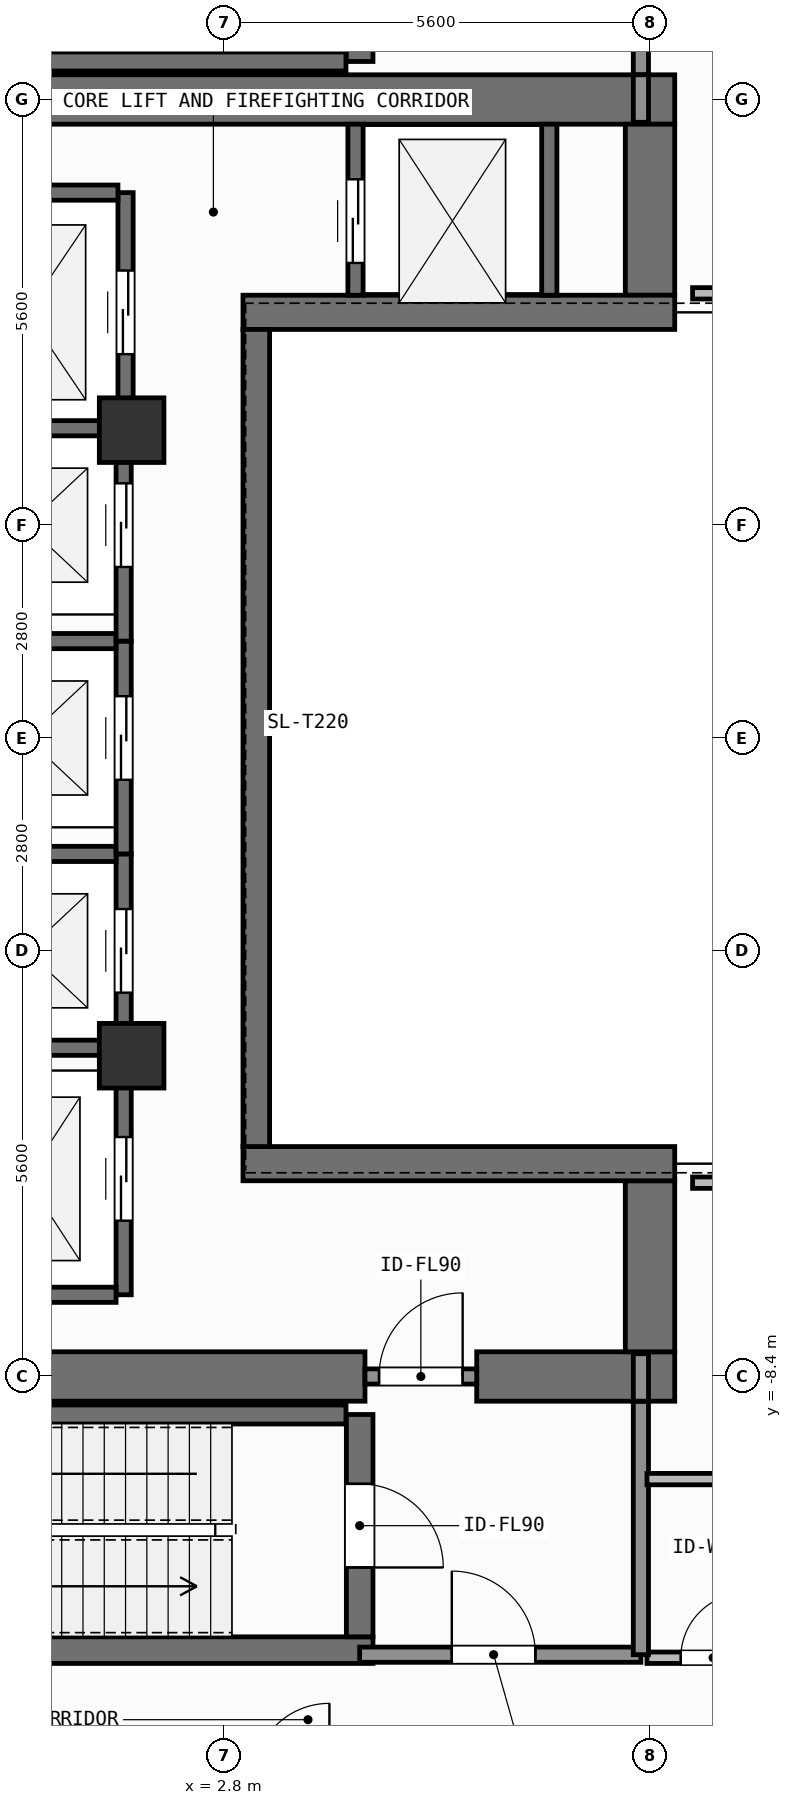
"""IFC4 building model, lengths in metres.
Left out: names, types, materials, properties, quantities, classifications, styles, units other than length and angle.
Written with IfcOpenShell. Run it as: python <this file> out.ifc"""

import sys

from ifc_helpers import new_model, si_unit, direction, frame, frame_2d, origin, origin_2d, place, context, subcontext, project, spatial, rectangle, extrude, element, fill, save


model = new_model("IFC4")
c1 = context("Model", 3, precision=1e-05, world=origin(), true_north=direction((0.0, 1.0)))
c2 = subcontext(c1, "Body", "Model", "MODEL_VIEW")
j1 = project(units=[si_unit("LENGTHUNIT", "METRE"), si_unit("PLANEANGLEUNIT", "RADIAN")], contexts=[c1])
p1 = place(None, origin())
s1 = spatial("IfcSite", under=j1, at=p1, CompositionType="ELEMENT")
p2 = place(p1, origin())
s2 = spatial("IfcBuilding", under=s1, at=p2, CompositionType="ELEMENT")
p3 = place(p2, frame((0.0, 0.0, 262.5)))
s3 = spatial("IfcBuildingStorey", under=s2, at=p3, CompositionType="ELEMENT", Elevation=262.5)
p4 = place(p3, frame((-2.62, -8.4, 0.0), z_axis=(0.0, 0.0, 1.0), x_axis=(1.0, 0.0, 0.0)))
e1 = element("IfcWall", 1, at=p4, inside=s3, PredefinedType="SHEAR", context=c2, shape_type="SweptSolid", body=[
    extrude(rectangle(XDim=7.27, YDim=0.65, at=frame_2d((3.635, 0.0))), origin(), (0.0, 0.0, 1.0), 3.9),
])
p5 = place(p3, frame((6.12, -8.4, 0.0), z_axis=(0.0, 0.0, 1.0), x_axis=(1.0, 0.0, 0.0)))
e2 = element("IfcWall", 2, at=p5, inside=s3, PredefinedType="SHEAR", context=c2, shape_type="SweptSolid", body=[
    extrude(rectangle(XDim=2.605, YDim=0.65, at=frame_2d((1.302, 0.0))), origin(), (0.0, 0.0, 1.0), 3.9),
])
p6 = place(p3, frame((-7.55, 8.4, 0.0), z_axis=(0.0, 0.0, 1.0), x_axis=(1.0, 0.0, 0.0)))
e3 = element("IfcWall", 3, at=p6, inside=s3, PredefinedType="SHEAR", context=c2, shape_type="SweptSolid", body=[
    extrude(rectangle(XDim=16.275, YDim=0.65, at=frame_2d((8.138, 0.0))), origin(), (0.0, 0.0, 1.0), 3.9),
])
for number, where, z_axis, x_axis in (
    (4, (8.4, -8.075, 0.0), (0.0, 0.0, 1.0), (0.0, 1.0, 0.0)),
    (5, (8.4, 5.825, 0.0), (0.0, 0.0, 1.0), (0.0, 1.0, 0.0)),
):
    element("IfcWall", number, at=place(p3, frame(where, z_axis=z_axis, x_axis=x_axis)), inside=s3, PredefinedType="SHEAR", context=c2, shape_type="SweptSolid", body=[
        extrude(rectangle(XDim=2.25, YDim=0.65, at=frame_2d((1.125, 0.0))), origin(), (0.0, 0.0, 1.0), 3.9),
    ])
for number, where, z_axis, x_axis in (
    (6, (3.045, -5.6, 0.0), (0.0, 0.0, 1.0), (1.0, 0.0, 0.0)),
    (7, (3.045, 5.6, 0.0), (0.0, 0.0, 1.0), (1.0, 0.0, 0.0)),
):
    element("IfcWall", number, at=place(p3, frame(where, z_axis=z_axis, x_axis=x_axis)), inside=s3, PredefinedType="SHEAR", context=c2, shape_type="SweptSolid", body=[
        extrude(rectangle(XDim=5.68, YDim=0.45, at=frame_2d((2.84, 0.0))), origin(), (0.0, 0.0, 1.0), 3.9),
    ])
p7 = place(p3, frame((3.22, -5.375, 0.0), z_axis=(0.0, 0.0, 1.0), x_axis=(0.0, 1.0, 0.0)))
e8 = element("IfcWall", 8, at=p7, inside=s3, PredefinedType="SHEAR", context=c2, shape_type="SweptSolid", body=[
    extrude(rectangle(XDim=10.75, YDim=0.35, at=frame_2d((5.375, 0.0))), origin(), (0.0, 0.0, 1.0), 3.9),
])
p8 = place(p3, frame((-2.555, -12.0, 0.0), z_axis=(0.0, 0.0, 1.0), x_axis=(1.0, 0.0, 0.0)))
e9 = element("IfcWall", 9, at=p8, inside=s3, PredefinedType="SHEAR", context=c2, shape_type="SweptSolid", body=[
    extrude(rectangle(XDim=7.31, YDim=0.35, at=frame_2d((3.655, 0.0))), origin(), (0.0, 0.0, 1.0), 3.9),
])
p9 = place(p3, frame((-2.2, -8.9, 0.0), z_axis=(0.0, 0.0, 1.0), x_axis=(1.0, 0.0, 0.0)))
e10 = element("IfcWall", 10, at=p9, inside=s3, PredefinedType="SHEAR", context=c2, shape_type="SweptSolid", body=[
    extrude(rectangle(XDim=6.6, YDim=0.25, at=frame_2d((3.3, 0.0))), origin(), (0.0, 0.0, 1.0), 3.9),
])
p10 = place(p3, frame((4.58, -8.9, 0.0), z_axis=(0.0, 0.0, 1.0), x_axis=(0.0, -1.0, 0.0)))
e11 = element("IfcWall", 11, at=p10, inside=s3, PredefinedType="SHEAR", context=c2, shape_type="SweptSolid", body=[
    extrude(rectangle(XDim=2.925, YDim=0.35, at=frame_2d((1.462, 0.0))), origin(), (0.0, 0.0, 1.0), 3.9),
])
p11 = place(p10, frame((0.913, 0.0, 0.0)))
e12 = element("IfcOpeningElement", 12, at=p11, cuts=e11, PredefinedType="OPENING", context=c2, shape_type="SweptSolid", body=[
    extrude(rectangle(XDim=1.1, YDim=2.15, at=frame_2d((0.55, 1.075))), frame((0.0, 0.185, 0.0), z_axis=(0.0, -1.0, 0.0), x_axis=(1.0, 0.0, 0.0)), (0.0, 0.0, 1.0), 0.37),
])
p12 = place(p3, frame((-2.2, 8.9, 0.0), z_axis=(0.0, 0.0, 1.0), x_axis=(1.0, 0.0, 0.0)))
e13 = element("IfcWall", 13, at=p12, inside=s3, PredefinedType="SHEAR", context=c2, shape_type="SweptSolid", body=[
    extrude(rectangle(XDim=6.6, YDim=0.25, at=frame_2d((3.3, 0.0))), origin(), (0.0, 0.0, 1.0), 3.9),
])
p13 = place(p3, frame((4.58, 11.825, 0.0), z_axis=(0.0, 0.0, 1.0), x_axis=(0.0, -1.0, 0.0)))
e14 = element("IfcWall", 14, at=p13, inside=s3, PredefinedType="SHEAR", context=c2, shape_type="SweptSolid", body=[
    extrude(rectangle(XDim=2.925, YDim=0.35, at=frame_2d((1.462, 0.0))), origin(), (0.0, 0.0, 1.0), 3.9),
])
p14 = place(p13, frame((0.913, 0.0, 0.0)))
e15 = element("IfcOpeningElement", 15, at=p14, cuts=e14, PredefinedType="OPENING", context=c2, shape_type="SweptSolid", body=[
    extrude(rectangle(XDim=1.1, YDim=2.15, at=frame_2d((0.55, 1.075))), frame((0.0, 0.185, 0.0), z_axis=(0.0, -1.0, 0.0), x_axis=(1.0, 0.0, 0.0)), (0.0, 0.0, 1.0), 0.37),
])
for number, where, z_axis, x_axis in (
    (16, (1.58, -4.18, 0.0), (0.0, 0.0, 1.0), (1.0, 0.0, 0.0)),
    (17, (1.58, 4.05, 0.0), (0.0, 0.0, 1.0), (1.0, 0.0, 0.0)),
):
    element("IfcColumn", number, at=place(p3, frame(where, z_axis=z_axis, x_axis=x_axis)), inside=s3, PredefinedType="COLUMN", context=c2, shape_type="SweptSolid", body=[
        extrude(rectangle(XDim=0.85, YDim=0.85, at=origin_2d()), origin(), (0.0, 0.0, 1.0), 3.9),
    ])
p15 = place(p3, frame((1.475, -4.275, 0.0), z_axis=(0.0, 0.0, 1.0), x_axis=(0.0, 1.0, 0.0)))
e18 = element("IfcWall", 18, at=p15, inside=s3, PredefinedType="SHEAR", context=c2, shape_type="SweptSolid", body=[
    extrude(rectangle(XDim=2.75, YDim=0.2, at=frame_2d((1.375, 0.0))), origin(), (0.0, 0.0, 1.0), 3.68),
])
p16 = place(p15, frame((0.925, 0.0, 0.0)))
e19 = element("IfcOpeningElement", 19, at=p16, cuts=e18, PredefinedType="OPENING", context=c2, shape_type="SweptSolid", body=[
    extrude(rectangle(XDim=1.1, YDim=2.2, at=frame_2d((0.55, 1.1))), frame((0.0, 0.11, 0.0), z_axis=(0.0, -1.0, 0.0), x_axis=(1.0, 0.0, 0.0)), (0.0, 0.0, 1.0), 0.22),
])
for number, where, z_axis, x_axis in (
    (20, (-0.975, -4.075, 0.0), (0.0, 0.0, 1.0), (1.0, 0.0, 0.0)),
    (21, (-0.975, -1.525, 0.0), (0.0, 0.0, 1.0), (1.0, 0.0, 0.0)),
):
    element("IfcWall", number, at=place(p3, frame(where, z_axis=z_axis, x_axis=x_axis)), inside=s3, PredefinedType="SHEAR", context=c2, shape_type="SweptSolid", body=[
        extrude(rectangle(XDim=2.35, YDim=0.2, at=frame_2d((1.175, 0.0))), origin(), (0.0, 0.0, 1.0), 3.68),
    ])
p17 = place(p3, frame((1.475, -1.525, 0.0), z_axis=(0.0, 0.0, 1.0), x_axis=(0.0, 1.0, 0.0)))
e22 = element("IfcWall", 22, at=p17, inside=s3, PredefinedType="SHEAR", context=c2, shape_type="SweptSolid", body=[
    extrude(rectangle(XDim=2.8, YDim=0.2, at=frame_2d((1.4, 0.0))), origin(), (0.0, 0.0, 1.0), 3.68),
])
p18 = place(p17, frame((0.975, 0.0, 0.0)))
e23 = element("IfcOpeningElement", 23, at=p18, cuts=e22, PredefinedType="OPENING", context=c2, shape_type="SweptSolid", body=[
    extrude(rectangle(XDim=1.1, YDim=2.2, at=frame_2d((0.55, 1.1))), frame((0.0, 0.11, 0.0), z_axis=(0.0, -1.0, 0.0), x_axis=(1.0, 0.0, 0.0)), (0.0, 0.0, 1.0), 0.22),
])
p19 = place(p3, frame((-0.975, 1.275, 0.0), z_axis=(0.0, 0.0, 1.0), x_axis=(1.0, 0.0, 0.0)))
e24 = element("IfcWall", 24, at=p19, inside=s3, PredefinedType="SHEAR", context=c2, shape_type="SweptSolid", body=[
    extrude(rectangle(XDim=2.35, YDim=0.2, at=frame_2d((1.175, 0.0))), origin(), (0.0, 0.0, 1.0), 3.68),
])
p20 = place(p3, frame((1.475, 1.275, 0.0), z_axis=(0.0, 0.0, 1.0), x_axis=(0.0, 1.0, 0.0)))
e25 = element("IfcWall", 25, at=p20, inside=s3, PredefinedType="SHEAR", context=c2, shape_type="SweptSolid", body=[
    extrude(rectangle(XDim=2.8, YDim=0.2, at=frame_2d((1.4, 0.0))), origin(), (0.0, 0.0, 1.0), 3.68),
])
p21 = place(p20, frame((0.975, 0.0, 0.0)))
e26 = element("IfcOpeningElement", 26, at=p21, cuts=e25, PredefinedType="OPENING", context=c2, shape_type="SweptSolid", body=[
    extrude(rectangle(XDim=1.1, YDim=2.2, at=frame_2d((0.55, 1.1))), frame((0.0, 0.11, 0.0), z_axis=(0.0, -1.0, 0.0), x_axis=(1.0, 0.0, 0.0)), (0.0, 0.0, 1.0), 0.22),
])
p22 = place(p3, frame((-0.975, 4.075, 0.0), z_axis=(0.0, 0.0, 1.0), x_axis=(1.0, 0.0, 0.0)))
e27 = element("IfcWall", 27, at=p22, inside=s3, PredefinedType="SHEAR", context=c2, shape_type="SweptSolid", body=[
    extrude(rectangle(XDim=2.35, YDim=0.2, at=frame_2d((1.175, 0.0))), origin(), (0.0, 0.0, 1.0), 3.68),
])
p23 = place(p3, frame((1.5, 4.025, 0.0), z_axis=(0.0, 0.0, 1.0), x_axis=(0.0, 1.0, 0.0)))
e28 = element("IfcWall", 28, at=p23, inside=s3, PredefinedType="SHEAR", context=c2, shape_type="SweptSolid", body=[
    extrude(rectangle(XDim=3.15, YDim=0.2, at=frame_2d((1.575, 0.0))), origin(), (0.0, 0.0, 1.0), 3.68),
])
p24 = place(p23, frame((1.025, 0.0, 0.0)))
e29 = element("IfcOpeningElement", 29, at=p24, cuts=e28, PredefinedType="OPENING", context=c2, shape_type="SweptSolid", body=[
    extrude(rectangle(XDim=1.1, YDim=2.2, at=frame_2d((0.55, 1.1))), frame((0.0, 0.11, 0.0), z_axis=(0.0, -1.0, 0.0), x_axis=(1.0, 0.0, 0.0)), (0.0, 0.0, 1.0), 0.22),
])
p25 = place(p3, frame((-1.0, 7.175, 0.0), z_axis=(0.0, 0.0, 1.0), x_axis=(1.0, 0.0, 0.0)))
e30 = element("IfcWall", 30, at=p25, inside=s3, PredefinedType="SHEAR", context=c2, shape_type="SweptSolid", body=[
    extrude(rectangle(XDim=2.4, YDim=0.2, at=frame_2d((1.2, 0.0))), origin(), (0.0, 0.0, 1.0), 3.68),
])
p26 = place(p3, frame((1.475, -7.325, 0.0), z_axis=(0.0, 0.0, 1.0), x_axis=(0.0, 1.0, 0.0)))
e31 = element("IfcWall", 31, at=p26, inside=s3, PredefinedType="SHEAR", context=c2, shape_type="SweptSolid", body=[
    extrude(rectangle(XDim=3.05, YDim=0.2, at=frame_2d((1.525, 0.0))), origin(), (0.0, 0.0, 1.0), 3.68),
])
p27 = place(p26, frame((0.975, 0.0, 0.0)))
e32 = element("IfcOpeningElement", 32, at=p27, cuts=e31, PredefinedType="OPENING", context=c2, shape_type="SweptSolid", body=[
    extrude(rectangle(XDim=1.1, YDim=2.2, at=frame_2d((0.55, 1.1))), frame((0.0, 0.11, 0.0), z_axis=(0.0, -1.0, 0.0), x_axis=(1.0, 0.0, 0.0)), (0.0, 0.0, 1.0), 0.22),
])
p28 = place(p3, frame((-0.975, -7.325, 0.0), z_axis=(0.0, 0.0, 1.0), x_axis=(1.0, 0.0, 0.0)))
e33 = element("IfcWall", 33, at=p28, inside=s3, PredefinedType="SHEAR", context=c2, shape_type="SweptSolid", body=[
    extrude(rectangle(XDim=2.35, YDim=0.2, at=frame_2d((1.175, 0.0))), origin(), (0.0, 0.0, 1.0), 3.68),
])
p29 = place(p3, frame((4.525, 5.825, 0.0), z_axis=(0.0, 0.0, 1.0), x_axis=(0.0, 1.0, 0.0)))
e34 = element("IfcWall", 34, at=p29, inside=s3, PredefinedType="SHEAR", context=c2, shape_type="SweptSolid", body=[
    extrude(rectangle(XDim=2.25, YDim=0.2, at=frame_2d((1.125, 0.0))), origin(), (0.0, 0.0, 1.0), 3.68),
])
p30 = place(p29, frame((0.425, 0.0, 0.0)))
e35 = element("IfcOpeningElement", 35, at=p30, cuts=e34, PredefinedType="OPENING", context=c2, shape_type="SweptSolid", body=[
    extrude(rectangle(XDim=1.1, YDim=2.2, at=frame_2d((0.55, 1.1))), frame((0.0, 0.11, 0.0), z_axis=(0.0, -1.0, 0.0), x_axis=(1.0, 0.0, 0.0)), (0.0, 0.0, 1.0), 0.22),
])
p31 = place(p3, frame((7.075, 5.825, 0.0), z_axis=(0.0, 0.0, 1.0), x_axis=(0.0, 1.0, 0.0)))
e36 = element("IfcWall", 36, at=p31, inside=s3, PredefinedType="SHEAR", context=c2, shape_type="SweptSolid", body=[
    extrude(rectangle(XDim=2.25, YDim=0.2, at=frame_2d((1.125, 0.0))), origin(), (0.0, 0.0, 1.0), 3.68),
])
p32 = place(p3, frame((4.58, -12.06, 0.0), z_axis=(0.0, 0.0, 1.0), x_axis=(1.0, 0.0, 0.0)))
e37 = element("IfcWall", 37, at=p32, inside=s3, PredefinedType="SOLIDWALL", context=c2, shape_type="SweptSolid", body=[
    extrude(rectangle(XDim=3.7, YDim=0.2, at=frame_2d((1.85, 0.0))), origin(), (0.0, 0.0, 1.0), 3.68),
])
p33 = place(p32, frame((1.212, 0.0, 0.0)))
e38 = element("IfcOpeningElement", 38, at=p33, cuts=e37, PredefinedType="OPENING", context=c2, shape_type="SweptSolid", body=[
    extrude(rectangle(XDim=1.1, YDim=2.15, at=frame_2d((0.55, 1.075))), frame((0.0, 0.11, 0.0), z_axis=(0.0, -1.0, 0.0), x_axis=(1.0, 0.0, 0.0)), (0.0, 0.0, 1.0), 0.22),
])
p34 = place(p3, frame((4.65, -8.4, 0.0), z_axis=(0.0, 0.0, 1.0), x_axis=(1.0, 0.0, 0.0)))
e39 = element("IfcWall", 39, at=p34, inside=s3, PredefinedType="SOLIDWALL", context=c2, shape_type="SweptSolid", body=[
    extrude(rectangle(XDim=1.47, YDim=0.2, at=frame_2d((0.735, 0.0))), origin(), (0.0, 0.0, 1.0), 2.92),
])
p35 = place(p34, frame((0.185, 0.0, 0.0)))
e40 = element("IfcOpeningElement", 40, at=p35, cuts=e39, PredefinedType="OPENING", context=c2, shape_type="SweptSolid", body=[
    extrude(rectangle(XDim=1.1, YDim=2.15, at=frame_2d((0.55, 1.075))), frame((0.0, 0.11, 0.0), z_axis=(0.0, -1.0, 0.0), x_axis=(1.0, 0.0, 0.0)), (0.0, 0.0, 1.0), 0.22),
])
p36 = place(p3, frame((8.36, -12.1, 0.0), z_axis=(0.0, 0.0, 1.0), x_axis=(1.0, 0.0, 0.0)))
e41 = element("IfcWall", 41, at=p36, inside=s3, PredefinedType="PARTITIONING", context=c2, shape_type="SweptSolid", body=[
    extrude(rectangle(XDim=1.74, YDim=0.15, at=frame_2d((0.87, 0.0))), origin(), (0.0, 0.0, 1.0), 3.68),
])
p37 = place(p36, frame((0.445, 0.0, 0.0)))
e42 = element("IfcOpeningElement", 42, at=p37, cuts=e41, PredefinedType="OPENING", context=c2, shape_type="SweptSolid", body=[
    extrude(rectangle(XDim=0.85, YDim=2.1, at=frame_2d((0.425, 1.05))), frame((0.0, 0.085, 0.0), z_axis=(0.0, -1.0, 0.0), x_axis=(1.0, 0.0, 0.0)), (0.0, 0.0, 1.0), 0.17),
])
for number, where, z_axis, x_axis in (
    (43, (8.28, -12.06, 0.0), (0.0, 0.0, 1.0), (0.0, 1.0, 0.0)),
    (44, (8.28, 8.725, 0.0), (0.0, 0.0, 1.0), (0.0, 1.0, 0.0)),
):
    element("IfcWall", number, at=place(p3, frame(where, z_axis=z_axis, x_axis=x_axis)), inside=s3, PredefinedType="SOLIDWALL", context=c2, shape_type="SweptSolid", body=[
        extrude(rectangle(XDim=3.335, YDim=0.2, at=frame_2d((1.667, 0.0))), origin(), (0.0, 0.0, 1.0), 3.68),
    ])
p38 = place(p3, frame((8.28, -8.725, 0.0), z_axis=(0.0, 0.0, 1.0), x_axis=(0.0, 1.0, 0.0)))
e45 = element("IfcWall", 45, at=p38, inside=s3, PredefinedType="SOLIDWALL", context=c2, shape_type="SweptSolid", body=[
    extrude(rectangle(XDim=0.625, YDim=0.2, at=frame_2d((0.312, 0.0))), origin(), (0.0, 0.0, 1.0), 3.68),
])
p39 = place(p3, frame((8.36, -9.75, 0.0), z_axis=(0.0, 0.0, 1.0), x_axis=(1.0, 0.0, 0.0)))
e46 = element("IfcWall", 46, at=p39, inside=s3, PredefinedType="PARTITIONING", context=c2, shape_type="SweptSolid", body=[
    extrude(rectangle(XDim=1.74, YDim=0.15, at=frame_2d((0.87, 0.0))), origin(), (0.0, 0.0, 1.0), 3.68),
])
p40 = place(p3, frame((8.96, -5.85, 0.0), z_axis=(0.0, 0.0, 1.0), x_axis=(1.0, 0.0, 0.0)))
e47 = element("IfcWall", 47, at=p40, inside=s3, PredefinedType="PARTITIONING", context=c2, shape_type="SweptSolid", body=[
    extrude(rectangle(XDim=6.62, YDim=0.15, at=frame_2d((3.31, 0.0))), origin(), (0.0, 0.0, 1.0), 3.68),
])
p41 = place(p3, frame((8.28, 8.1, 0.0), z_axis=(0.0, 0.0, 1.0), x_axis=(0.0, 1.0, 0.0)))
e48 = element("IfcWall", 48, at=p41, inside=s3, PredefinedType="SOLIDWALL", context=c2, shape_type="SweptSolid", body=[
    extrude(rectangle(XDim=0.625, YDim=0.2, at=frame_2d((0.312, 0.0))), origin(), (0.0, 0.0, 1.0), 3.68),
])
p42 = place(p3, frame((8.96, 5.85, 0.0), z_axis=(0.0, 0.0, 1.0), x_axis=(1.0, 0.0, 0.0)))
e49 = element("IfcWall", 49, at=p42, inside=s3, PredefinedType="PARTITIONING", context=c2, shape_type="SweptSolid", body=[
    extrude(rectangle(XDim=6.62, YDim=0.15, at=frame_2d((3.31, 0.0))), origin(), (0.0, 0.0, 1.0), 3.68),
])
p43 = place(p16, origin())
e50 = element("IfcDoor", 50, at=p43, inside=s3, OperationType="SLIDING_TO_LEFT", PredefinedType="DOOR", context=c2, shape_type="SweptSolid", body=[
    extrude(rectangle(XDim=1.1, YDim=2.2, at=frame_2d((0.55, 1.1))), frame((0.0, 0.025, 0.0), z_axis=(0.0, -1.0, 0.0), x_axis=(1.0, 0.0, 0.0)), (0.0, 0.0, 1.0), 0.05),
])
fill(e19, e50)
p44 = place(p18, origin())
e51 = element("IfcDoor", 51, at=p44, inside=s3, OperationType="SLIDING_TO_LEFT", PredefinedType="DOOR", context=c2, shape_type="SweptSolid", body=[
    extrude(rectangle(XDim=1.1, YDim=2.2, at=frame_2d((0.55, 1.1))), frame((0.0, 0.025, 0.0), z_axis=(0.0, -1.0, 0.0), x_axis=(1.0, 0.0, 0.0)), (0.0, 0.0, 1.0), 0.05),
])
fill(e23, e51)
p45 = place(p21, origin())
e52 = element("IfcDoor", 52, at=p45, inside=s3, OperationType="SLIDING_TO_LEFT", PredefinedType="DOOR", context=c2, shape_type="SweptSolid", body=[
    extrude(rectangle(XDim=1.1, YDim=2.2, at=frame_2d((0.55, 1.1))), frame((0.0, 0.025, 0.0), z_axis=(0.0, -1.0, 0.0), x_axis=(1.0, 0.0, 0.0)), (0.0, 0.0, 1.0), 0.05),
])
fill(e26, e52)
p46 = place(p24, origin())
e53 = element("IfcDoor", 53, at=p46, inside=s3, OperationType="SLIDING_TO_LEFT", PredefinedType="DOOR", context=c2, shape_type="SweptSolid", body=[
    extrude(rectangle(XDim=1.1, YDim=2.2, at=frame_2d((0.55, 1.1))), frame((0.0, 0.025, 0.0), z_axis=(0.0, -1.0, 0.0), x_axis=(1.0, 0.0, 0.0)), (0.0, 0.0, 1.0), 0.05),
])
fill(e29, e53)
p47 = place(p27, origin())
e54 = element("IfcDoor", 54, at=p47, inside=s3, OperationType="SLIDING_TO_LEFT", PredefinedType="DOOR", context=c2, shape_type="SweptSolid", body=[
    extrude(rectangle(XDim=1.1, YDim=2.2, at=frame_2d((0.55, 1.1))), frame((0.0, 0.025, 0.0), z_axis=(0.0, -1.0, 0.0), x_axis=(1.0, 0.0, 0.0)), (0.0, 0.0, 1.0), 0.05),
])
fill(e32, e54)
p48 = place(p30, origin())
e55 = element("IfcDoor", 55, at=p48, inside=s3, OperationType="SLIDING_TO_LEFT", PredefinedType="DOOR", context=c2, shape_type="SweptSolid", body=[
    extrude(rectangle(XDim=1.1, YDim=2.2, at=frame_2d((0.55, 1.1))), frame((0.0, 0.025, 0.0), z_axis=(0.0, -1.0, 0.0), x_axis=(1.0, 0.0, 0.0)), (0.0, 0.0, 1.0), 0.05),
])
fill(e35, e55)
p49 = place(p11, origin())
e56 = element("IfcDoor", 56, at=p49, inside=s3, OperationType="SINGLE_SWING_RIGHT", PredefinedType="DOOR", context=c2, shape_type="SweptSolid", body=[
    extrude(rectangle(XDim=1.1, YDim=2.15, at=frame_2d((0.55, 1.075))), frame((0.0, 0.025, 0.0), z_axis=(0.0, -1.0, 0.0), x_axis=(1.0, 0.0, 0.0)), (0.0, 0.0, 1.0), 0.05),
])
fill(e12, e56)
p50 = place(p33, origin())
e57 = element("IfcDoor", 57, at=p50, inside=s3, OperationType="SINGLE_SWING_LEFT", PredefinedType="DOOR", context=c2, shape_type="SweptSolid", body=[
    extrude(rectangle(XDim=1.1, YDim=2.15, at=frame_2d((0.55, 1.075))), frame((0.0, 0.025, 0.0), z_axis=(0.0, -1.0, 0.0), x_axis=(1.0, 0.0, 0.0)), (0.0, 0.0, 1.0), 0.05),
])
fill(e38, e57)
p51 = place(p35, origin())
e58 = element("IfcDoor", 58, at=p51, inside=s3, OperationType="SINGLE_SWING_RIGHT", PredefinedType="DOOR", context=c2, shape_type="SweptSolid", body=[
    extrude(rectangle(XDim=1.1, YDim=2.15, at=frame_2d((0.55, 1.075))), frame((0.0, 0.025, 0.0), z_axis=(0.0, -1.0, 0.0), x_axis=(1.0, 0.0, 0.0)), (0.0, 0.0, 1.0), 0.05),
])
fill(e40, e58)
p52 = place(p37, origin())
e59 = element("IfcDoor", 59, at=p52, inside=s3, OperationType="SINGLE_SWING_RIGHT", PredefinedType="DOOR", context=c2, shape_type="SweptSolid", body=[
    extrude(rectangle(XDim=0.85, YDim=2.1, at=frame_2d((0.425, 1.05))), frame((0.0, 0.025, 0.0), z_axis=(0.0, -1.0, 0.0), x_axis=(1.0, 0.0, 0.0)), (0.0, 0.0, 1.0), 0.05),
])
fill(e42, e59)
save(model, sys.argv[1])
